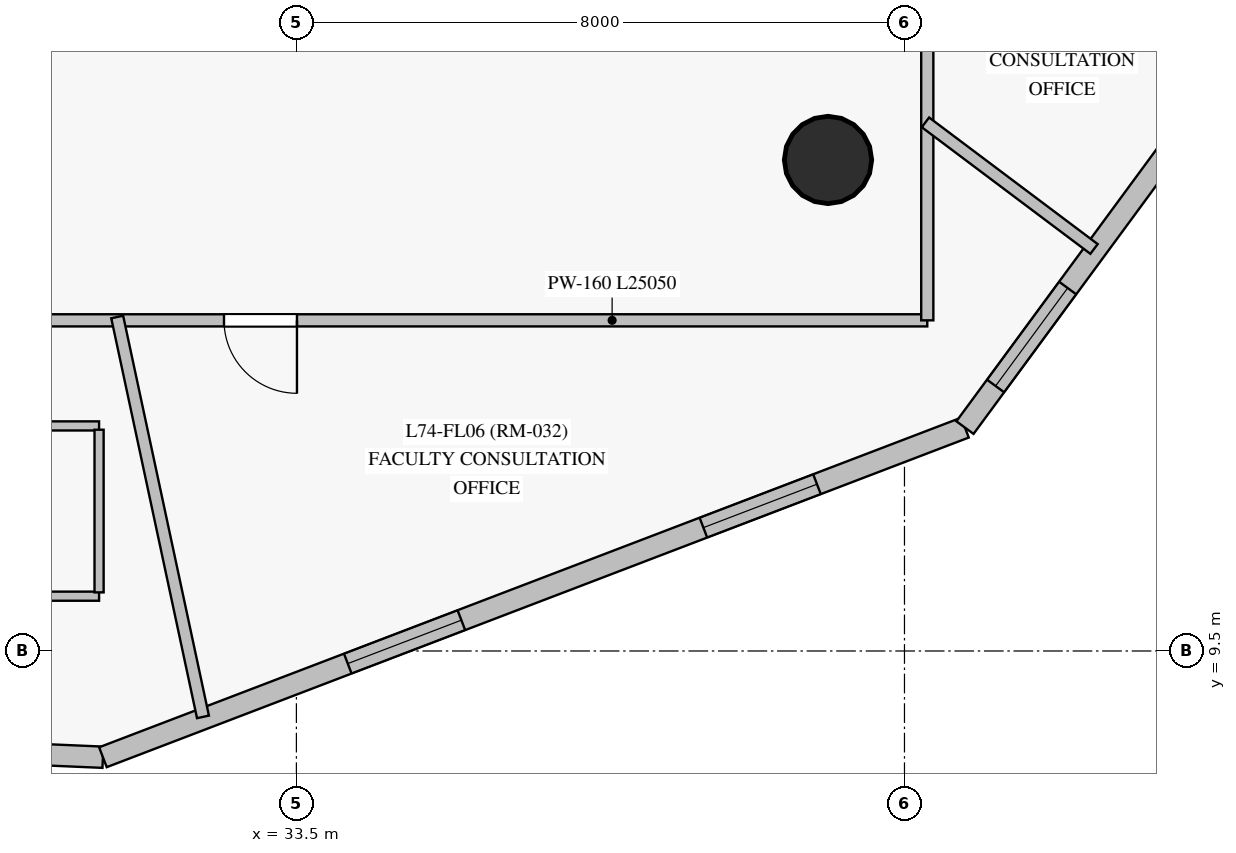
"""IFC4 building model, lengths in metres.
Left out: names, types, materials, properties, quantities, classifications, styles, units other than length and angle.
Written with IfcOpenShell. Run it as: python <this file> out.ifc"""

import sys

from ifc_helpers import new_model, si_unit, direction, frame, frame_2d, origin, origin_with_axes, origin_2d, place, context, subcontext, project, spatial, rectangle, circle, extrude, source, transform, mapped, element, fill, save


model = new_model("IFC4")
c1 = context("Model", 3, precision=1e-05, world=origin(), true_north=direction((0.0, 1.0)))
c2 = subcontext(c1, "Body", "Model", "MODEL_VIEW")
j1 = project(units=[si_unit("LENGTHUNIT", "METRE"), si_unit("PLANEANGLEUNIT", "RADIAN")], contexts=[c1])
p1 = place(None, origin())
s1 = spatial("IfcSite", under=j1, at=p1, CompositionType="ELEMENT")
p2 = place(p1, origin())
s2 = spatial("IfcBuilding", under=s1, at=p2, CompositionType="ELEMENT")
p3 = place(p2, frame((0.0, 0.0, 250.45)))
s3 = spatial("IfcBuildingStorey", under=s2, at=p3, CompositionType="ELEMENT", Elevation=250.45)
m1 = source(origin_with_axes(), c2, "Body", "SweptSolid", [
    extrude(circle(Radius=0.575, at=origin_2d()), origin(), (0.0, 0.0, 1.0), 3.05),
])
p4 = place(p3, frame((40.494, 15.96, 0.0), z_axis=(0.0, 0.0, 1.0), x_axis=(1.0, 0.0, 0.0)))
e1 = element("IfcColumn", 1, at=p4, inside=s3, PredefinedType="COLUMN", context=c2, shape_type="MappedRepresentation", body=[
    mapped(m1, transform((0.0, 0.0, 0.0), scale=1.0)),
])
p5 = place(p3, frame((21.95, 8.489, 0.0), z_axis=(0.0, 0.0, 1.0), x_axis=(0.999077856383, -0.042935263879, 0.0)))
e2 = element("IfcWall", 2, at=p5, inside=s3, PredefinedType="SOLIDWALL", context=c2, shape_type="SweptSolid", body=[
    extrude(rectangle(XDim=9.013, YDim=0.28, at=frame_2d((4.506, 0.0))), origin(), (0.0, 0.0, 1.0), 2.85),
])
p6 = place(p5, frame((0.585, 0.0, 0.85)))
e3 = element("IfcOpeningElement", 3, at=p6, cuts=e2, PredefinedType="OPENING", context=c2, shape_type="SweptSolid", body=[
    extrude(rectangle(XDim=1.6, YDim=1.6, at=frame_2d((0.8, 0.8))), frame((0.0, 0.15, 0.0), z_axis=(0.0, -1.0, 0.0), x_axis=(1.0, 0.0, 0.0)), (0.0, 0.0, 1.0), 0.3),
])
p7 = place(p5, frame((5.031, 0.0, 0.85)))
e4 = element("IfcOpeningElement", 4, at=p7, cuts=e2, PredefinedType="OPENING", context=c2, shape_type="SweptSolid", body=[
    extrude(rectangle(XDim=1.6, YDim=1.6, at=frame_2d((0.8, 0.8))), frame((0.0, 0.15, 0.0), z_axis=(0.0, -1.0, 0.0), x_axis=(1.0, 0.0, 0.0)), (0.0, 0.0, 1.0), 0.3),
])
p8 = place(p3, frame((30.955, 8.102, 0.0), z_axis=(0.0, 0.0, 1.0), x_axis=(0.934050651189, 0.357140561984, 0.0)))
e5 = element("IfcWall", 5, at=p8, inside=s3, PredefinedType="SOLIDWALL", context=c2, shape_type="SweptSolid", body=[
    extrude(rectangle(XDim=12.142, YDim=0.28, at=frame_2d((6.071, 0.0))), origin(), (0.0, 0.0, 1.0), 2.85),
])
p9 = place(p8, frame((3.449, 0.0, 0.85)))
e6 = element("IfcOpeningElement", 6, at=p9, cuts=e5, PredefinedType="OPENING", context=c2, shape_type="SweptSolid", body=[
    extrude(rectangle(XDim=1.6, YDim=1.6, at=frame_2d((0.8, 0.8))), frame((0.0, 0.15, 0.0), z_axis=(0.0, -1.0, 0.0), x_axis=(1.0, 0.0, 0.0)), (0.0, 0.0, 1.0), 0.3),
])
p10 = place(p8, frame((8.458, 0.0, 0.85)))
e7 = element("IfcOpeningElement", 7, at=p10, cuts=e5, PredefinedType="OPENING", context=c2, shape_type="SweptSolid", body=[
    extrude(rectangle(XDim=1.6, YDim=1.6, at=frame_2d((0.8, 0.8))), frame((0.0, 0.15, 0.0), z_axis=(0.0, -1.0, 0.0), x_axis=(1.0, 0.0, 0.0)), (0.0, 0.0, 1.0), 0.3),
])
p11 = place(p3, frame((42.296, 12.439, 0.0), z_axis=(0.0, 0.0, 1.0), x_axis=(0.592559902782, 0.805526387907, 0.0)))
e8 = element("IfcWall", 8, at=p11, inside=s3, PredefinedType="SOLIDWALL", context=c2, shape_type="SweptSolid", body=[
    extrude(rectangle(XDim=8.993, YDim=0.28, at=frame_2d((4.497, 0.0))), origin(), (0.0, 0.0, 1.0), 2.85),
])
p12 = place(p11, frame((0.68, 0.0, 0.85)))
e9 = element("IfcOpeningElement", 9, at=p12, cuts=e8, PredefinedType="OPENING", context=c2, shape_type="SweptSolid", body=[
    extrude(rectangle(XDim=1.6, YDim=1.6, at=frame_2d((0.8, 0.8))), frame((0.0, 0.15, 0.0), z_axis=(0.0, -1.0, 0.0), x_axis=(1.0, 0.0, 0.0)), (0.0, 0.0, 1.0), 0.3),
])
p13 = place(p11, frame((5.116, 0.0, 0.85)))
e10 = element("IfcOpeningElement", 10, at=p13, cuts=e8, PredefinedType="OPENING", context=c2, shape_type="SweptSolid", body=[
    extrude(rectangle(XDim=1.6, YDim=1.6, at=frame_2d((0.8, 0.8))), frame((0.0, 0.15, 0.0), z_axis=(0.0, -1.0, 0.0), x_axis=(1.0, 0.0, 0.0)), (0.0, 0.0, 1.0), 0.3),
])
p14 = place(p3, frame((41.8, 13.85, 0.0), z_axis=(0.0, 0.0, 1.0), x_axis=(-1.0, 0.0, 0.0)))
e11 = element("IfcWall", 11, at=p14, inside=s3, PredefinedType="PARTITIONING", context=c2, shape_type="SweptSolid", body=[
    extrude(rectangle(XDim=25.05, YDim=0.16, at=frame_2d((12.525, 0.0))), origin(), (0.0, 0.0, 1.0), 2.3),
])
p15 = place(p14, frame((12.791, 0.0, 0.0)))
e12 = element("IfcOpeningElement", 12, at=p15, cuts=e11, PredefinedType="OPENING", context=c2, shape_type="SweptSolid", body=[
    extrude(rectangle(XDim=0.96, YDim=2.15, at=frame_2d((0.48, 1.075))), frame((0.0, 0.09, 0.0), z_axis=(0.0, -1.0, 0.0), x_axis=(1.0, 0.0, 0.0)), (0.0, 0.0, 1.0), 0.18),
])
p16 = place(p14, frame((21.704, 0.0, 0.0)))
e13 = element("IfcOpeningElement", 13, at=p16, cuts=e11, PredefinedType="OPENING", context=c2, shape_type="SweptSolid", body=[
    extrude(rectangle(XDim=0.96, YDim=2.15, at=frame_2d((0.48, 1.075))), frame((0.0, 0.09, 0.0), z_axis=(0.0, -1.0, 0.0), x_axis=(1.0, 0.0, 0.0)), (0.0, 0.0, 1.0), 0.18),
])
p17 = place(p14, frame((16.298, 0.0, 0.0)))
e14 = element("IfcOpeningElement", 14, at=p17, cuts=e11, PredefinedType="OPENING", context=c2, shape_type="SweptSolid", body=[
    extrude(rectangle(XDim=0.96, YDim=2.15, at=frame_2d((0.48, 1.075))), frame((0.0, 0.09, 0.0), z_axis=(0.0, -1.0, 0.0), x_axis=(1.0, 0.0, 0.0)), (0.0, 0.0, 1.0), 0.18),
])
p18 = place(p14, frame((8.292, 0.0, 0.0)))
e15 = element("IfcOpeningElement", 15, at=p18, cuts=e11, PredefinedType="OPENING", context=c2, shape_type="SweptSolid", body=[
    extrude(rectangle(XDim=0.96, YDim=2.15, at=frame_2d((0.48, 1.075))), frame((0.0, 0.09, 0.0), z_axis=(0.0, -1.0, 0.0), x_axis=(1.0, 0.0, 0.0)), (0.0, 0.0, 1.0), 0.18),
])
p19 = place(p3, frame((41.8, 33.45, 0.0), z_axis=(0.0, 0.0, 1.0), x_axis=(0.0, -1.0, 0.0)))
e16 = element("IfcWall", 16, at=p19, inside=s3, PredefinedType="PARTITIONING", context=c2, shape_type="SweptSolid", body=[
    extrude(rectangle(XDim=19.6, YDim=0.16, at=frame_2d((9.8, 0.0))), origin(), (0.0, 0.0, 1.0), 2.3),
])
p20 = place(p19, frame((12.265, 0.0, 0.0)))
e17 = element("IfcOpeningElement", 17, at=p20, cuts=e16, PredefinedType="OPENING", context=c2, shape_type="SweptSolid", body=[
    extrude(rectangle(XDim=0.96, YDim=2.15, at=frame_2d((0.48, 1.075))), frame((0.0, 0.09, 0.0), z_axis=(0.0, -1.0, 0.0), x_axis=(1.0, 0.0, 0.0)), (0.0, 0.0, 1.0), 0.18),
])
p21 = place(p19, frame((8.835, 0.0, 0.0)))
e18 = element("IfcOpeningElement", 18, at=p21, cuts=e16, PredefinedType="OPENING", context=c2, shape_type="SweptSolid", body=[
    extrude(rectangle(XDim=0.96, YDim=2.15, at=frame_2d((0.48, 1.075))), frame((0.0, 0.09, 0.0), z_axis=(0.0, -1.0, 0.0), x_axis=(1.0, 0.0, 0.0)), (0.0, 0.0, 1.0), 0.18),
])
p22 = place(p3, frame((31.143, 13.894, 0.0), z_axis=(0.0, 0.0, 1.0), x_axis=(0.209708802078, -0.9777638868, 0.0)))
e19 = element("IfcWall", 19, at=p22, inside=s3, PredefinedType="PARTITIONING", context=c2, shape_type="SweptSolid", body=[
    extrude(rectangle(XDim=5.381, YDim=0.16, at=frame_2d((2.69, 0.0))), origin(), (0.0, 0.0, 1.0), 2.85),
])
p23 = place(p3, frame((41.776, 16.455, 0.0), z_axis=(0.0, 0.0, 1.0), x_axis=(0.799651310339, -0.60046463832, 0.0)))
e20 = element("IfcWall", 20, at=p23, inside=s3, PredefinedType="PARTITIONING", context=c2, shape_type="SweptSolid", body=[
    extrude(rectangle(XDim=2.774, YDim=0.16, at=frame_2d((1.387, 0.0))), origin(), (0.0, 0.0, 1.0), 2.85),
])
p24 = place(p3, frame((28.544, 10.221, 0.0), z_axis=(0.0, 0.0, 1.0), x_axis=(1.0, 0.0, 0.0)))
e21 = element("IfcWall", 21, at=p24, inside=s3, PredefinedType="PARTITIONING", context=c2, shape_type="SweptSolid", body=[
    extrude(rectangle(XDim=2.36, YDim=0.12, at=frame_2d((1.18, 0.0))), origin(), (0.0, 0.0, 1.0), 2.85),
])
p25 = place(p24, frame((0.75, 0.0, 0.0)))
e22 = element("IfcOpeningElement", 22, at=p25, cuts=e21, PredefinedType="OPENING", context=c2, shape_type="SweptSolid", body=[
    extrude(rectangle(XDim=0.86, YDim=2.1, at=frame_2d((0.43, 1.05))), frame((0.0, 0.07, 0.0), z_axis=(0.0, -1.0, 0.0), x_axis=(1.0, 0.0, 0.0)), (0.0, 0.0, 1.0), 0.14),
])
p26 = place(p3, frame((30.904, 12.461, 0.0), z_axis=(0.0, 0.0, 1.0), x_axis=(-1.0, 0.0, 0.0)))
e23 = element("IfcWall", 23, at=p26, inside=s3, PredefinedType="PARTITIONING", context=c2, shape_type="SweptSolid", body=[
    extrude(rectangle(XDim=2.36, YDim=0.12, at=frame_2d((1.18, 0.0))), origin(), (0.0, 0.0, 1.0), 2.3),
])
p27 = place(p3, frame((30.904, 10.271, 0.0), z_axis=(0.0, 0.0, 1.0), x_axis=(0.0, 1.0, 0.0)))
e24 = element("IfcWall", 24, at=p27, inside=s3, PredefinedType="PARTITIONING", context=c2, shape_type="SweptSolid", body=[
    extrude(rectangle(XDim=2.14, YDim=0.12, at=frame_2d((1.07, 0.0))), origin(), (0.0, 0.0, 1.0), 2.85),
])
m2 = source(origin_with_axes(), c2, "Body", "SweptSolid", [
    extrude(rectangle(XDim=1.6, YDim=1.6, at=frame_2d((0.8, 0.8))), frame((0.0, 0.03, 0.0), z_axis=(0.0, -1.0, 0.0), x_axis=(1.0, 0.0, 0.0)), (0.0, 0.0, 1.0), 0.06),
])
p28 = place(p9, origin())
e25 = element("IfcWindow", 25, at=p28, inside=s3, PartitioningType="SINGLE_PANEL", PredefinedType="WINDOW", context=c2, shape_type="MappedRepresentation", body=[
    mapped(m2, transform((0.0, 0.0, 0.0), scale=1.0)),
])
fill(e6, e25)
p29 = place(p10, origin())
e26 = element("IfcWindow", 26, at=p29, inside=s3, PartitioningType="SINGLE_PANEL", PredefinedType="WINDOW", context=c2, shape_type="MappedRepresentation", body=[
    mapped(m2, transform((0.0, 0.0, 0.0), scale=1.0)),
])
fill(e7, e26)
p30 = place(p12, origin())
e27 = element("IfcWindow", 27, at=p30, inside=s3, PartitioningType="SINGLE_PANEL", PredefinedType="WINDOW", context=c2, shape_type="MappedRepresentation", body=[
    mapped(m2, transform((0.0, 0.0, 0.0), scale=1.0)),
])
fill(e9, e27)
m3 = source(origin_with_axes(), c2, "Body", "SweptSolid", [
    extrude(rectangle(XDim=0.96, YDim=2.15, at=frame_2d((0.48, 1.075))), frame((0.0, 0.025, 0.0), z_axis=(0.0, -1.0, 0.0), x_axis=(1.0, 0.0, 0.0)), (0.0, 0.0, 1.0), 0.05),
])
p31 = place(p18, origin())
e28 = element("IfcDoor", 28, at=p31, inside=s3, OperationType="SINGLE_SWING_LEFT", PredefinedType="DOOR", context=c2, shape_type="MappedRepresentation", body=[
    mapped(m3, transform((0.0, 0.0, 0.0), scale=1.0)),
])
fill(e15, e28)
save(model, sys.argv[1])
